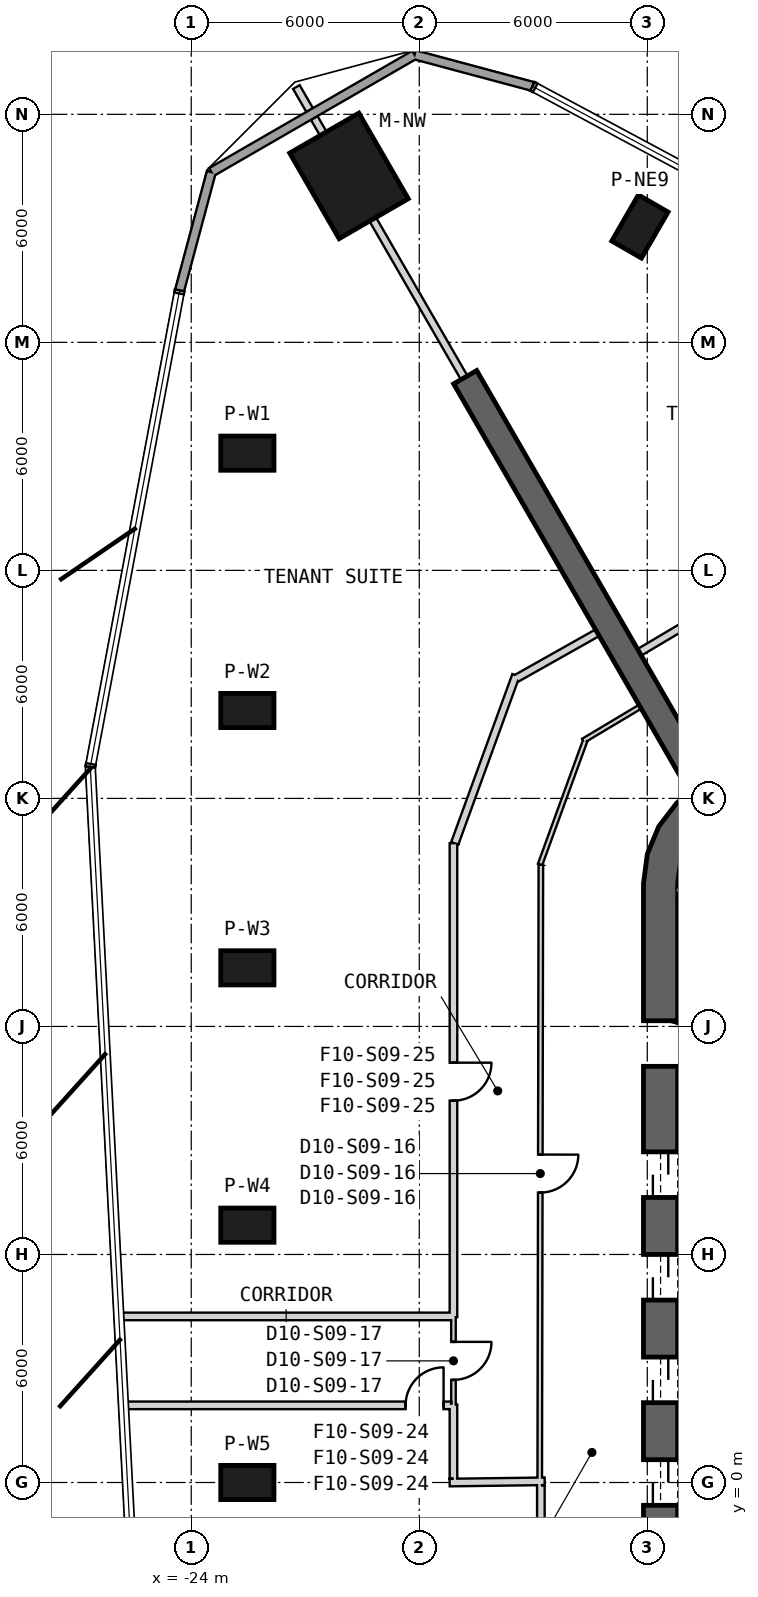
"""IFC4 building model, lengths in metres.
Left out: names, types, materials, properties, quantities, classifications, styles, units other than length and angle.
Written with IfcOpenShell. Run it as: python <this file> out.ifc"""

import sys

from ifc_helpers import new_model, si_unit, direction, frame, frame_2d, origin, origin_2d, place, context, subcontext, project, spatial, polyline, rectangle, outline, extrude, element, fill, save


model = new_model("IFC4")
c1 = context("Model", 3, precision=1e-05, world=origin(), true_north=direction((0.0, 1.0)))
c2 = subcontext(c1, "Body", "Model", "MODEL_VIEW")
j1 = project(units=[si_unit("LENGTHUNIT", "METRE"), si_unit("PLANEANGLEUNIT", "RADIAN")], contexts=[c1])
p1 = place(None, origin())
s1 = spatial("IfcSite", under=j1, at=p1, CompositionType="ELEMENT")
p2 = place(p1, origin())
s2 = spatial("IfcBuilding", under=s1, at=p2, CompositionType="ELEMENT")
p3 = place(p2, frame((0.0, 0.0, 169.2)))
s3 = spatial("IfcBuildingStorey", under=s2, at=p3, CompositionType="ELEMENT", Elevation=169.2)
p4 = place(p3, frame((-19.849, 34.379, 0.0), z_axis=(0.0, 0.0, 1.0), x_axis=(-0.5, 0.866025403784, 0.0)))
e1 = element("IfcColumn", 1, at=p4, inside=s3, PredefinedType="COLUMN", context=c2, shape_type="SweptSolid", body=[
    extrude(rectangle(XDim=2.6, YDim=2.1, at=origin_2d()), origin(), (0.0, 0.0, 1.0), 4.0),
])
for number, where, z_axis, x_axis in (
    (2, (-22.524, 27.084, -0.3), (0.0, 0.0, 1.0), (-1.0, 0.0, 0.0)),
    (3, (-22.524, 20.313, -0.3), (0.0, 0.0, 1.0), (-1.0, 0.0, 0.0)),
    (4, (-22.524, 13.542, -0.3), (0.0, 0.0, 1.0), (-1.0, 0.0, 0.0)),
    (5, (-22.524, 6.771, -0.3), (0.0, 0.0, 1.0), (-1.0, 0.0, 0.0)),
    (6, (-22.524, 0.0, -0.3), (0.0, 0.0, 1.0), (-1.0, 0.0, 0.0)),
    (7, (-12.194, 33.048, -0.3), (0.0, 0.0, 1.0), (0.5, 0.866, 0.0)),
):
    element("IfcColumn", number, at=place(p3, frame(where, z_axis=z_axis, x_axis=x_axis)), inside=s3, PredefinedType="COLUMN", context=c2, shape_type="SweptSolid", body=[
        extrude(rectangle(XDim=1.4, YDim=0.9, at=origin_2d()), origin(), (0.0, 0.0, 1.0), 4.3),
    ])
p5 = place(p3, frame((-11.65, 15.762, 0.0), z_axis=(0.0, 0.0, 1.0), x_axis=(0.0, -1.0, 0.0)))
e8 = element("IfcWall", 8, at=p5, inside=s3, PredefinedType="SHEAR", context=c2, shape_type="SweptSolid", body=[
    extrude(rectangle(XDim=31.523, YDim=0.9, at=frame_2d((15.762, 0.0))), origin(), (0.0, 0.0, 1.0), 4.0),
])
p6 = place(p5, frame((7.062, 0.0, 0.0)))
e9 = element("IfcOpeningElement", 9, at=p6, cuts=e8, PredefinedType="OPENING", context=c2, shape_type="SweptSolid", body=[
    extrude(rectangle(XDim=1.2, YDim=2.4, at=frame_2d((0.6, 1.2))), frame((0.0, 0.46, 0.0), z_axis=(0.0, -1.0, 0.0), x_axis=(1.0, 0.0, 0.0)), (0.0, 0.0, 1.0), 0.92),
])
p7 = place(p5, frame((9.762, 0.0, 0.0)))
e10 = element("IfcOpeningElement", 10, at=p7, cuts=e8, PredefinedType="OPENING", context=c2, shape_type="SweptSolid", body=[
    extrude(rectangle(XDim=1.2, YDim=2.4, at=frame_2d((0.6, 1.2))), frame((0.0, 0.46, 0.0), z_axis=(0.0, -1.0, 0.0), x_axis=(1.0, 0.0, 0.0)), (0.0, 0.0, 1.0), 0.92),
])
p8 = place(p5, frame((12.462, 0.0, 0.0)))
e11 = element("IfcOpeningElement", 11, at=p8, cuts=e8, PredefinedType="OPENING", context=c2, shape_type="SweptSolid", body=[
    extrude(rectangle(XDim=1.2, YDim=2.4, at=frame_2d((0.6, 1.2))), frame((0.0, 0.46, 0.0), z_axis=(0.0, -1.0, 0.0), x_axis=(1.0, 0.0, 0.0)), (0.0, 0.0, 1.0), 0.92),
])
p9 = place(p5, frame((15.162, 0.0, 0.0)))
e12 = element("IfcOpeningElement", 12, at=p9, cuts=e8, PredefinedType="OPENING", context=c2, shape_type="SweptSolid", body=[
    extrude(rectangle(XDim=1.2, YDim=2.4, at=frame_2d((0.6, 1.2))), frame((0.0, 0.46, 0.0), z_axis=(0.0, -1.0, 0.0), x_axis=(1.0, 0.0, 0.0)), (0.0, 0.0, 1.0), 0.92),
])
p10 = place(p5, frame((17.862, 0.0, 0.0)))
e13 = element("IfcOpeningElement", 13, at=p10, cuts=e8, PredefinedType="OPENING", context=c2, shape_type="SweptSolid", body=[
    extrude(rectangle(XDim=1.2, YDim=2.4, at=frame_2d((0.6, 1.2))), frame((0.0, 0.46, 0.0), z_axis=(0.0, -1.0, 0.0), x_axis=(1.0, 0.0, 0.0)), (0.0, 0.0, 1.0), 0.92),
])
p11 = place(p5, frame((20.562, 0.0, 0.0)))
e14 = element("IfcOpeningElement", 14, at=p11, cuts=e8, PredefinedType="OPENING", context=c2, shape_type="SweptSolid", body=[
    extrude(rectangle(XDim=1.2, YDim=2.4, at=frame_2d((0.6, 1.2))), frame((0.0, 0.46, 0.0), z_axis=(0.0, -1.0, 0.0), x_axis=(1.0, 0.0, 0.0)), (0.0, 0.0, 1.0), 0.92),
])
p12 = place(p5, frame((23.262, 0.0, 0.0)))
e15 = element("IfcOpeningElement", 15, at=p12, cuts=e8, PredefinedType="OPENING", context=c2, shape_type="SweptSolid", body=[
    extrude(rectangle(XDim=1.2, YDim=2.4, at=frame_2d((0.6, 1.2))), frame((0.0, 0.46, 0.0), z_axis=(0.0, -1.0, 0.0), x_axis=(1.0, 0.0, 0.0)), (0.0, 0.0, 1.0), 0.92),
])
p13 = place(p5, frame((3.612, 0.0, 0.0)))
e16 = element("IfcOpeningElement", 16, at=p13, cuts=e8, PredefinedType="OPENING", context=c2, shape_type="SweptSolid", body=[
    extrude(rectangle(XDim=1.2, YDim=2.4, at=frame_2d((0.6, 1.2))), frame((0.0, 0.46, 0.0), z_axis=(0.0, -1.0, 0.0), x_axis=(1.0, 0.0, 0.0)), (0.0, 0.0, 1.0), 0.92),
])
p14 = place(p5, frame((26.712, 0.0, 0.0)))
e17 = element("IfcOpeningElement", 17, at=p14, cuts=e8, PredefinedType="OPENING", context=c2, shape_type="SweptSolid", body=[
    extrude(rectangle(XDim=1.2, YDim=2.4, at=frame_2d((0.6, 1.2))), frame((0.0, 0.46, 0.0), z_axis=(0.0, -1.0, 0.0), x_axis=(1.0, 0.0, 0.0)), (0.0, 0.0, 1.0), 0.92),
])
p15 = place(p3, origin())
e18 = element("IfcWall", 18, at=p15, inside=s3, PredefinedType="SHEAR", context=c2, shape_type="SweptSolid", body=[
    extrude(outline(polyline([(-7.6, 18.36), (-8.323, 18.659), (-9.1, 18.762), (-9.876, 18.659), (-10.6, 18.36), (-11.221, 17.883), (-11.698, 17.262), (-11.998, 16.538), (-12.1, 15.762), (-11.2, 15.762), (-11.128, 16.305), (-10.919, 16.812), (-10.585, 17.247), (-10.15, 17.58), (-9.644, 17.79), (-9.1, 17.862), (-8.556, 17.79), (-8.05, 17.58), (-7.6, 18.36)])), origin(), (0.0, 0.0, 1.0), 4.0),
])
p16 = place(p3, frame((-10.575, 18.316, 0.0), z_axis=(0.0, 0.0, 1.0), x_axis=(-0.499995558535, 0.86602796805, 0.0)))
e19 = element("IfcWall", 19, at=p16, inside=s3, PredefinedType="SHEAR", context=c2, shape_type="SweptSolid", body=[
    extrude(rectangle(XDim=12.433, YDim=0.7, at=frame_2d((6.216, 0.0))), origin(), (0.0, 0.0, 1.0), 4.0),
])
p17 = place(p3, frame((-15.02, 36.735, 0.0), z_axis=(0.0, 0.0, 1.0), x_axis=(-0.965921607741, 0.258834788424, 0.0)))
e20 = element("IfcWall", 20, at=p17, inside=s3, PredefinedType="SOLIDWALL", context=c2, shape_type="SweptSolid", body=[
    extrude(rectangle(XDim=3.215, YDim=0.24, at=frame_2d((1.607, 0.0))), origin(), (0.0, 0.0, 1.0), 3.7),
])
p18 = place(p3, frame((-18.125, 37.567, 0.0), z_axis=(0.0, 0.0, 1.0), x_axis=(-0.866030202489, -0.499991688307, 0.0)))
e21 = element("IfcWall", 21, at=p18, inside=s3, PredefinedType="SOLIDWALL", context=c2, shape_type="SweptSolid", body=[
    extrude(rectangle(XDim=6.175, YDim=0.24, at=frame_2d((3.087, 0.0))), origin(), (0.0, 0.0, 1.0), 3.7),
])
p19 = place(p3, frame((-23.472, 34.48, 0.0), z_axis=(0.0, 0.0, 1.0), x_axis=(-0.258770153522, -0.965938925423, 0.0)))
e22 = element("IfcWall", 22, at=p19, inside=s3, PredefinedType="SOLIDWALL", context=c2, shape_type="SweptSolid", body=[
    extrude(rectangle(XDim=3.224, YDim=0.24, at=frame_2d((1.612, 0.0))), origin(), (0.0, 0.0, 1.0), 3.7),
])
p20 = place(p3, frame((-11.2, 9.42, 0.0), z_axis=(0.0, 0.0, 1.0), x_axis=(0.999957167047, 0.009255488683, 0.0)))
e23 = element("IfcWall", 23, at=p20, inside=s3, PredefinedType="PLUMBINGWALL", context=c2, shape_type="SweptSolid", body=[
    extrude(rectangle(XDim=3.35, YDim=0.2, at=frame_2d((1.675, 0.0))), origin(), (0.0, 0.0, 1.0), 3.7),
])
p21 = place(p3, frame((-11.245, 15.678, -0.3), z_axis=(0.0, 0.0, 1.0), x_axis=(0.499977274689, -0.866038523851, 0.0)))
e24 = element("IfcWall", 24, at=p21, inside=s3, PredefinedType="SHEAR", context=c2, shape_type="SweptSolid", body=[
    extrude(rectangle(XDim=8.1, YDim=0.2, at=frame_2d((4.05, 0.0))), origin(), (0.0, 0.0, 1.0), 4.0),
])
p22 = place(p3, frame((-12.189, 20.411, 0.0), z_axis=(0.0, 0.0, 1.0), x_axis=(-0.858492721014, -0.51282574815, 0.0)))
e25 = element("IfcWall", 25, at=p22, inside=s3, PredefinedType="PARTITIONING", context=c2, shape_type="SweptSolid", body=[
    extrude(rectangle(XDim=1.742, YDim=0.12, at=frame_2d((0.871, 0.0))), origin(), (0.0, 0.0, 1.0), 3.7),
])
p23 = place(p3, frame((-13.631, 19.53, 0.0), z_axis=(0.0, 0.0, 1.0), x_axis=(-0.342069878069, -0.939674517329, 0.0)))
e26 = element("IfcWall", 26, at=p23, inside=s3, PredefinedType="PARTITIONING", context=c2, shape_type="SweptSolid", body=[
    extrude(rectangle(XDim=3.479, YDim=0.12, at=frame_2d((1.739, 0.0))), origin(), (0.0, 0.0, 1.0), 2.78),
])
p24 = place(p3, frame((-14.8, 16.257, 0.0), z_axis=(0.0, 0.0, 1.0), x_axis=(-0.001847148781, -0.999998294019, 0.0)))
e27 = element("IfcWall", 27, at=p24, inside=s3, PredefinedType="PARTITIONING", context=c2, shape_type="SweptSolid", body=[
    extrude(rectangle(XDim=16.257, YDim=0.12, at=frame_2d((8.128, 0.0))), origin(), (0.0, 0.0, 1.0), 2.88),
])
p25 = place(p24, frame((7.629, 0.0, 0.0)))
e28 = element("IfcOpeningElement", 28, at=p25, cuts=e27, PredefinedType="OPENING", context=c2, shape_type="SweptSolid", body=[
    extrude(rectangle(XDim=1.0, YDim=2.1, at=frame_2d((0.5, 1.05))), frame((0.0, 0.07, 0.0), z_axis=(0.0, -1.0, 0.0), x_axis=(1.0, 0.0, 0.0)), (0.0, 0.0, 1.0), 0.14),
])
p26 = place(p3, frame((-17.1, 4.35, 0.0), z_axis=(0.0, 0.0, 1.0), x_axis=(0.0, -1.0, 0.0)))
e29 = element("IfcWall", 29, at=p26, inside=s3, PredefinedType="PARTITIONING", context=c2, shape_type="SweptSolid", body=[
    extrude(rectangle(XDim=2.3, YDim=0.12, at=frame_2d((1.15, 0.0))), origin(), (0.0, 0.0, 1.0), 3.7),
])
p27 = place(p26, frame((0.65, 0.0, 0.0)))
e30 = element("IfcOpeningElement", 30, at=p27, cuts=e29, PredefinedType="OPENING", context=c2, shape_type="SweptSolid", body=[
    extrude(rectangle(XDim=1.0, YDim=2.1, at=frame_2d((0.5, 1.05))), frame((0.0, 0.07, 0.0), z_axis=(0.0, -1.0, 0.0), x_axis=(1.0, 0.0, 0.0)), (0.0, 0.0, 1.0), 0.14),
])
p28 = place(p3, frame((-17.2, -0.001, 0.0), z_axis=(0.0, 0.0, 1.0), x_axis=(0.999915662945, 0.012987185857, 0.0)))
e31 = element("IfcWall", 31, at=p28, inside=s3, PredefinedType="PARTITIONING", context=c2, shape_type="SweptSolid", body=[
    extrude(rectangle(XDim=2.5, YDim=0.2, at=frame_2d((1.25, 0.0))), origin(), (0.0, 0.0, 1.0), 3.07),
])
p29 = place(p3, frame((-17.1, 16.823, 0.0), z_axis=(0.0, 0.0, 1.0), x_axis=(0.0, -1.0, 0.0)))
e32 = element("IfcWall", 32, at=p29, inside=s3, PredefinedType="PARTITIONING", context=c2, shape_type="SweptSolid", body=[
    extrude(rectangle(XDim=12.473, YDim=0.2, at=frame_2d((6.236, 0.0))), origin(), (0.0, 0.0, 1.0), 2.88),
])
p30 = place(p29, frame((5.776, 0.0, 0.0)))
e33 = element("IfcOpeningElement", 33, at=p30, cuts=e32, PredefinedType="OPENING", context=c2, shape_type="SweptSolid", body=[
    extrude(rectangle(XDim=1.0, YDim=2.1, at=frame_2d((0.5, 1.05))), frame((0.0, 0.11, 0.0), z_axis=(0.0, -1.0, 0.0), x_axis=(1.0, 0.0, 0.0)), (0.0, 0.0, 1.0), 0.22),
])
p31 = place(p3, frame((-17.1, 2.05, 0.0), z_axis=(0.0, 0.0, 1.0), x_axis=(0.0, -1.0, 0.0)))
e34 = element("IfcWall", 34, at=p31, inside=s3, PredefinedType="PARTITIONING", context=c2, shape_type="SweptSolid", body=[
    extrude(rectangle(XDim=1.95, YDim=0.2, at=frame_2d((0.975, 0.0))), origin(), (0.0, 0.0, 1.0), 3.07),
])
p32 = place(p3, frame((-15.456, 21.239, 0.0), z_axis=(0.0, 0.0, 1.0), x_axis=(-0.34205546997, -0.939679762187, 0.0)))
e35 = element("IfcWall", 35, at=p32, inside=s3, PredefinedType="PARTITIONING", context=c2, shape_type="SweptSolid", body=[
    extrude(rectangle(XDim=4.706, YDim=0.2, at=frame_2d((2.353, 0.0))), origin(), (0.0, 0.0, 1.0), 2.78),
])
p33 = place(p3, frame((-13.313, 22.359, 0.0), z_axis=(0.0, 0.0, 1.0), x_axis=(-0.87121710687, -0.490897904555, 0.0)))
e36 = element("IfcWall", 36, at=p33, inside=s3, PredefinedType="PARTITIONING", context=c2, shape_type="SweptSolid", body=[
    extrude(rectangle(XDim=2.457, YDim=0.2, at=frame_2d((1.229, 0.0))), origin(), (0.0, 0.0, 1.0), 3.7),
])
p34 = place(p3, frame((-14.8, -0.07, 0.0), z_axis=(0.0, 0.0, 1.0), x_axis=(0.0, -1.0, 0.0)))
e37 = element("IfcWall", 37, at=p34, inside=s3, PredefinedType="PARTITIONING", context=c2, shape_type="SweptSolid", body=[
    extrude(rectangle(XDim=10.13, YDim=0.2, at=frame_2d((5.065, 0.0))), origin(), (0.0, 0.0, 1.0), 2.98),
])
p35 = place(p3, frame((-10.265, 22.996, 0.0), z_axis=(0.0, 0.0, 1.0), x_axis=(-0.859934823121, -0.510403859687, 0.0)))
e38 = element("IfcWall", 38, at=p35, inside=s3, PredefinedType="PARTITIONING", context=c2, shape_type="SweptSolid", body=[
    extrude(rectangle(XDim=2.258, YDim=0.2, at=frame_2d((1.129, 0.0))), origin(), (0.0, 0.0, 1.0), 3.7),
])
p36 = place(p3, frame((-25.784, 2.03, 0.0), z_axis=(0.0, 0.0, 1.0), x_axis=(1.0, 0.0, 0.0)))
e39 = element("IfcWall", 39, at=p36, inside=s3, PredefinedType="PARTITIONING", context=c2, shape_type="SweptSolid", body=[
    extrude(rectangle(XDim=8.624, YDim=0.2, at=frame_2d((4.312, 0.0))), origin(), (0.0, 0.0, 1.0), 3.7),
])
p37 = place(p36, frame((7.424, 0.0, 0.0)))
e40 = element("IfcOpeningElement", 40, at=p37, cuts=e39, PredefinedType="OPENING", context=c2, shape_type="SweptSolid", body=[
    extrude(rectangle(XDim=1.0, YDim=2.1, at=frame_2d((0.5, 1.05))), frame((0.0, 0.11, 0.0), z_axis=(0.0, -1.0, 0.0), x_axis=(1.0, 0.0, 0.0)), (0.0, 0.0, 1.0), 0.22),
])
p38 = place(p3, frame((-17.16, 4.37, 0.0), z_axis=(0.0, 0.0, 1.0), x_axis=(-1.0, 0.0, 0.0)))
e41 = element("IfcWall", 41, at=p38, inside=s3, PredefinedType="PARTITIONING", context=c2, shape_type="SweptSolid", body=[
    extrude(rectangle(XDim=8.745, YDim=0.2, at=frame_2d((4.373, 0.0))), origin(), (0.0, 0.0, 1.0), 3.7),
])
p39 = place(p3, frame((-16.817, 29.068, 0.0), z_axis=(0.0, 0.0, 1.0), x_axis=(-0.499988695522, 0.866031930329, 0.0)))
e42 = element("IfcWall", 42, at=p39, inside=s3, PredefinedType="PARTITIONING", context=c2, shape_type="SweptSolid", body=[
    extrude(rectangle(XDim=4.815, YDim=0.2, at=frame_2d((2.408, 0.0))), origin(), (0.0, 0.0, 1.0), 3.27),
])
p40 = place(p3, frame((-20.525, 35.49, 0.0), z_axis=(0.0, 0.0, 1.0), x_axis=(-0.499869636591, 0.866100656052, 0.0)))
e43 = element("IfcWall", 43, at=p40, inside=s3, PredefinedType="PARTITIONING", context=c2, shape_type="SweptSolid", body=[
    extrude(rectangle(XDim=0.479, YDim=0.2, at=frame_2d((0.239, 0.0))), origin(), (0.0, 0.0, 1.0), 3.7),
])
p41 = place(p3, frame((-20.884, 36.113, 0.0), z_axis=(0.0, 0.0, 1.0), x_axis=(-0.49989369433, 0.866086770693, 0.0)))
e44 = element("IfcWall", 44, at=p41, inside=s3, PredefinedType="PARTITIONING", context=c2, shape_type="SweptSolid", body=[
    extrude(rectangle(XDim=0.699, YDim=0.2, at=frame_2d((0.35, 0.0))), origin(), (0.0, 0.0, 1.0), 3.7),
])
p42 = place(p25, origin())
e45 = element("IfcDoor", 45, at=p42, inside=s3, OperationType="SINGLE_SWING_LEFT", PredefinedType="NOTDEFINED", context=c2, shape_type="SweptSolid", body=[
    extrude(rectangle(XDim=1.0, YDim=2.1, at=frame_2d((0.5, 1.05))), frame((0.0, 0.025, 0.0), z_axis=(0.0, -1.0, 0.0), x_axis=(1.0, 0.0, 0.0)), (0.0, 0.0, 1.0), 0.05),
])
fill(e28, e45)
p43 = place(p27, origin())
e46 = element("IfcDoor", 46, at=p43, inside=s3, OperationType="SINGLE_SWING_RIGHT", PredefinedType="NOTDEFINED", context=c2, shape_type="SweptSolid", body=[
    extrude(rectangle(XDim=1.0, YDim=2.1, at=frame_2d((0.5, 1.05))), frame((0.0, 0.025, 0.0), z_axis=(0.0, -1.0, 0.0), x_axis=(1.0, 0.0, 0.0)), (0.0, 0.0, 1.0), 0.05),
])
fill(e30, e46)
p44 = place(p37, origin())
e47 = element("IfcDoor", 47, at=p44, inside=s3, OperationType="SINGLE_SWING_RIGHT", PredefinedType="USERDEFINED", context=c2, shape_type="SweptSolid", body=[
    extrude(rectangle(XDim=1.0, YDim=2.1, at=frame_2d((0.5, 1.05))), frame((0.0, 0.025, 0.0), z_axis=(0.0, -1.0, 0.0), x_axis=(1.0, 0.0, 0.0)), (0.0, 0.0, 1.0), 0.05),
])
fill(e40, e47)
p45 = place(p30, origin())
e48 = element("IfcDoor", 48, at=p45, inside=s3, OperationType="SINGLE_SWING_LEFT", PredefinedType="USERDEFINED", context=c2, shape_type="SweptSolid", body=[
    extrude(rectangle(XDim=1.0, YDim=2.1, at=frame_2d((0.5, 1.05))), frame((0.0, 0.025, 0.0), z_axis=(0.0, -1.0, 0.0), x_axis=(1.0, 0.0, 0.0)), (0.0, 0.0, 1.0), 0.05),
])
fill(e33, e48)
p46 = place(p6, origin())
e49 = element("IfcDoor", 49, at=p46, inside=s3, OperationType="SLIDING_TO_LEFT", PredefinedType="USERDEFINED", context=c2, shape_type="SweptSolid", body=[
    extrude(rectangle(XDim=1.2, YDim=2.4, at=frame_2d((0.6, 1.2))), frame((0.0, 0.025, 0.0), z_axis=(0.0, -1.0, 0.0), x_axis=(1.0, 0.0, 0.0)), (0.0, 0.0, 1.0), 0.05),
])
fill(e9, e49)
p47 = place(p7, origin())
e50 = element("IfcDoor", 50, at=p47, inside=s3, OperationType="SLIDING_TO_LEFT", PredefinedType="USERDEFINED", context=c2, shape_type="SweptSolid", body=[
    extrude(rectangle(XDim=1.2, YDim=2.4, at=frame_2d((0.6, 1.2))), frame((0.0, 0.025, 0.0), z_axis=(0.0, -1.0, 0.0), x_axis=(1.0, 0.0, 0.0)), (0.0, 0.0, 1.0), 0.05),
])
fill(e10, e50)
p48 = place(p8, origin())
e51 = element("IfcDoor", 51, at=p48, inside=s3, OperationType="SLIDING_TO_LEFT", PredefinedType="USERDEFINED", context=c2, shape_type="SweptSolid", body=[
    extrude(rectangle(XDim=1.2, YDim=2.4, at=frame_2d((0.6, 1.2))), frame((0.0, 0.025, 0.0), z_axis=(0.0, -1.0, 0.0), x_axis=(1.0, 0.0, 0.0)), (0.0, 0.0, 1.0), 0.05),
])
fill(e11, e51)
p49 = place(p9, origin())
e52 = element("IfcDoor", 52, at=p49, inside=s3, OperationType="SLIDING_TO_LEFT", PredefinedType="USERDEFINED", context=c2, shape_type="SweptSolid", body=[
    extrude(rectangle(XDim=1.2, YDim=2.4, at=frame_2d((0.6, 1.2))), frame((0.0, 0.025, 0.0), z_axis=(0.0, -1.0, 0.0), x_axis=(1.0, 0.0, 0.0)), (0.0, 0.0, 1.0), 0.05),
])
fill(e12, e52)
p50 = place(p13, origin())
e53 = element("IfcDoor", 53, at=p50, inside=s3, OperationType="SINGLE_SWING_RIGHT", PredefinedType="USERDEFINED", context=c2, shape_type="SweptSolid", body=[
    extrude(rectangle(XDim=1.2, YDim=2.4, at=frame_2d((0.6, 1.2))), frame((0.0, 0.025, 0.0), z_axis=(0.0, -1.0, 0.0), x_axis=(1.0, 0.0, 0.0)), (0.0, 0.0, 1.0), 0.05),
])
fill(e16, e53)
save(model, sys.argv[1])
